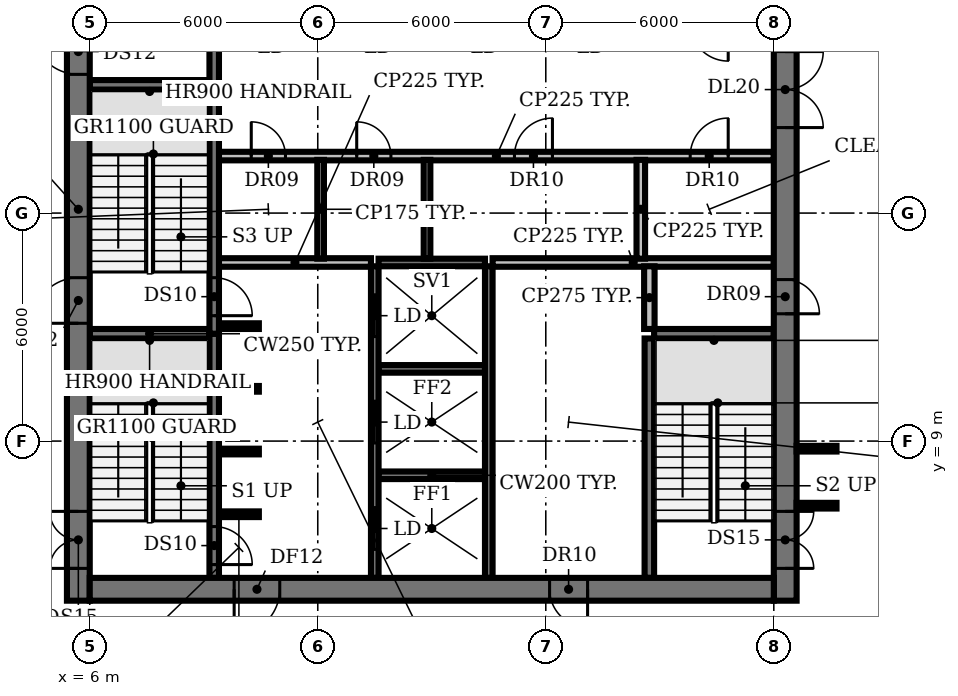
"""IFC4 building model, lengths in metres.
Left out: names, types, materials, properties, quantities, classifications, styles, units other than length and angle.
Written with IfcOpenShell. Run it as: python <this file> out.ifc"""

import sys

from ifc_helpers import new_model, si_unit, direction, frame, frame_2d, origin, place, context, subcontext, project, spatial, rectangle, extrude, element, fill, save


model = new_model("IFC4")
c1 = context("Model", 3, precision=1e-05, world=origin(), true_north=direction((0.0, 1.0)))
c2 = subcontext(c1, "Body", "Model", "MODEL_VIEW")
j1 = project(units=[si_unit("LENGTHUNIT", "METRE"), si_unit("PLANEANGLEUNIT", "RADIAN")], contexts=[c1])
p1 = place(None, origin())
s1 = spatial("IfcSite", under=j1, at=p1, CompositionType="ELEMENT")
p2 = place(p1, origin())
s2 = spatial("IfcBuilding", under=s1, at=p2, CompositionType="ELEMENT")
p3 = place(p2, frame((0.0, 0.0, 188.6)))
s3 = spatial("IfcBuildingStorey", under=s2, at=p3, CompositionType="ELEMENT", Elevation=188.6)
p4 = place(p3, frame((9.4, 7.075, 0.0), z_axis=(0.0, 0.0, 1.0), x_axis=(1.0, 0.0, 0.0)))
e1 = element("IfcWall", 1, at=p4, inside=s3, PredefinedType="SHEAR", context=c2, shape_type="SweptSolid", body=[
    extrude(rectangle(XDim=1.05, YDim=0.15, at=frame_2d((0.525, 0.0))), origin(), (0.0, 0.0, 1.0), 3.85),
])
p5 = place(p3, frame((13.6, 8.1, 0.0), z_axis=(0.0, 0.0, 1.0), x_axis=(1.0, 0.0, 0.0)))
e2 = element("IfcWall", 2, at=p5, inside=s3, PredefinedType="SHEAR", context=c2, shape_type="SweptSolid", body=[
    extrude(rectangle(XDim=2.8, YDim=0.2, at=frame_2d((1.4, 0.0))), origin(), (0.0, 0.0, 1.0), 3.85),
])
for number, where, z_axis, x_axis in (
    (3, (9.4, 8.725, 0.0), (0.0, 0.0, 1.0), (1.0, 0.0, 0.0)),
    (4, (9.4, 10.375, 0.0), (0.0, 0.0, 1.0), (1.0, 0.0, 0.0)),
):
    element("IfcWall", number, at=place(p3, frame(where, z_axis=z_axis, x_axis=x_axis)), inside=s3, PredefinedType="SHEAR", context=c2, shape_type="SweptSolid", body=[
        extrude(rectangle(XDim=1.05, YDim=0.15, at=frame_2d((0.525, 0.0))), origin(), (0.0, 0.0, 1.0), 3.85),
    ])
p6 = place(p3, frame((13.6, 10.9, 0.0), z_axis=(0.0, 0.0, 1.0), x_axis=(1.0, 0.0, 0.0)))
e5 = element("IfcWall", 5, at=p6, inside=s3, PredefinedType="SHEAR", context=c2, shape_type="SweptSolid", body=[
    extrude(rectangle(XDim=2.8, YDim=0.2, at=frame_2d((1.4, 0.0))), origin(), (0.0, 0.0, 1.0), 3.85),
])
for number, where, z_axis, x_axis in (
    (6, (6.0, 11.825, 0.0), (0.0, 0.0, 1.0), (1.0, 0.0, 0.0)),
    (7, (20.85, 11.825, 0.0), (0.0, 0.0, 1.0), (1.0, 0.0, 0.0)),
):
    element("IfcWall", number, at=place(p3, frame(where, z_axis=z_axis, x_axis=x_axis)), inside=s3, PredefinedType="SHEAR", context=c2, shape_type="SweptSolid", body=[
        extrude(rectangle(XDim=3.15, YDim=0.25, at=frame_2d((1.575, 0.0))), origin(), (0.0, 0.0, 1.0), 3.85),
    ])
p7 = place(p3, frame((9.4, 12.025, 0.0), z_axis=(0.0, 0.0, 1.0), x_axis=(1.0, 0.0, 0.0)))
e8 = element("IfcWall", 8, at=p7, inside=s3, PredefinedType="SHEAR", context=c2, shape_type="SweptSolid", body=[
    extrude(rectangle(XDim=1.05, YDim=0.15, at=frame_2d((0.525, 0.0))), origin(), (0.0, 0.0, 1.0), 3.85),
])
p8 = place(p3, frame((9.4, 13.7, 0.0), z_axis=(0.0, 0.0, 1.0), x_axis=(1.0, 0.0, 0.0)))
e9 = element("IfcWall", 9, at=p8, inside=s3, PredefinedType="PARTITIONING", context=c2, shape_type="SweptSolid", body=[
    extrude(rectangle(XDim=4.0, YDim=0.225, at=frame_2d((2.0, 0.0))), origin(), (0.0, 0.0, 1.0), 3.85),
])
p9 = place(p3, frame((13.6, 13.7, 0.0), z_axis=(0.0, 0.0, 1.0), x_axis=(1.0, 0.0, 0.0)))
e10 = element("IfcWall", 10, at=p9, inside=s3, PredefinedType="SHEAR", context=c2, shape_type="SweptSolid", body=[
    extrude(rectangle(XDim=2.8, YDim=0.2, at=frame_2d((1.4, 0.0))), origin(), (0.0, 0.0, 1.0), 3.85),
])
p10 = place(p3, frame((16.6, 13.7, 0.0), z_axis=(0.0, 0.0, 1.0), x_axis=(1.0, 0.0, 0.0)))
e11 = element("IfcWall", 11, at=p10, inside=s3, PredefinedType="PARTITIONING", context=c2, shape_type="SweptSolid", body=[
    extrude(rectangle(XDim=7.4, YDim=0.225, at=frame_2d((3.7, 0.0))), origin(), (0.0, 0.0, 1.0), 3.85),
])
p11 = place(p3, frame((9.4, 16.5, 0.0), z_axis=(0.0, 0.0, 1.0), x_axis=(1.0, 0.0, 0.0)))
e12 = element("IfcWall", 12, at=p11, inside=s3, PredefinedType="PARTITIONING", context=c2, shape_type="SweptSolid", body=[
    extrude(rectangle(XDim=14.6, YDim=0.225, at=frame_2d((7.3, 0.0))), origin(), (0.0, 0.0, 1.0), 3.85),
])
p12 = place(p11, frame((0.85, 0.0, 0.0)))
e13 = element("IfcOpeningElement", 13, at=p12, cuts=e12, PredefinedType="OPENING", context=c2, shape_type="SweptSolid", body=[
    extrude(rectangle(XDim=0.9, YDim=2.1, at=frame_2d((0.45, 1.05))), frame((0.0, 0.123, 0.0), z_axis=(0.0, -1.0, 0.0), x_axis=(1.0, 0.0, 0.0)), (0.0, 0.0, 1.0), 0.245),
])
p13 = place(p11, frame((3.625, 0.0, 0.0)))
e14 = element("IfcOpeningElement", 14, at=p13, cuts=e12, PredefinedType="OPENING", context=c2, shape_type="SweptSolid", body=[
    extrude(rectangle(XDim=0.9, YDim=2.1, at=frame_2d((0.45, 1.05))), frame((0.0, 0.123, 0.0), z_axis=(0.0, -1.0, 0.0), x_axis=(1.0, 0.0, 0.0)), (0.0, 0.0, 1.0), 0.245),
])
p14 = place(p11, frame((7.775, 0.0, 0.0)))
e15 = element("IfcOpeningElement", 15, at=p14, cuts=e12, PredefinedType="OPENING", context=c2, shape_type="SweptSolid", body=[
    extrude(rectangle(XDim=1.0, YDim=2.1, at=frame_2d((0.5, 1.05))), frame((0.0, 0.123, 0.0), z_axis=(0.0, -1.0, 0.0), x_axis=(1.0, 0.0, 0.0)), (0.0, 0.0, 1.0), 0.245),
])
p15 = place(p11, frame((12.4, 0.0, 0.0)))
e16 = element("IfcOpeningElement", 16, at=p15, cuts=e12, PredefinedType="OPENING", context=c2, shape_type="SweptSolid", body=[
    extrude(rectangle(XDim=1.0, YDim=2.1, at=frame_2d((0.5, 1.05))), frame((0.0, 0.123, 0.0), z_axis=(0.0, -1.0, 0.0), x_axis=(1.0, 0.0, 0.0)), (0.0, 0.0, 1.0), 0.245),
])
p16 = place(p3, frame((6.0, 18.375, 0.0), z_axis=(0.0, 0.0, 1.0), x_axis=(1.0, 0.0, 0.0)))
e17 = element("IfcWall", 17, at=p16, inside=s3, PredefinedType="SHEAR", context=c2, shape_type="SweptSolid", body=[
    extrude(rectangle(XDim=3.15, YDim=0.25, at=frame_2d((1.575, 0.0))), origin(), (0.0, 0.0, 1.0), 3.85),
])
p17 = place(p3, frame((9.275, 11.825, 0.0), z_axis=(0.0, 0.0, 1.0), x_axis=(0.0, -1.0, 0.0)))
e18 = element("IfcWall", 18, at=p17, inside=s3, PredefinedType="SHEAR", context=c2, shape_type="SweptSolid", body=[
    extrude(rectangle(XDim=6.425, YDim=0.25, at=frame_2d((3.212, 0.0))), origin(), (0.0, 0.0, 1.0), 3.85),
])
p18 = place(p17, frame((5.075, 0.0, 0.0)))
e19 = element("IfcOpeningElement", 19, at=p18, cuts=e18, PredefinedType="OPENING", context=c2, shape_type="SweptSolid", body=[
    extrude(rectangle(XDim=1.0, YDim=2.1, at=frame_2d((0.5, 1.05))), frame((0.0, 0.135, 0.0), z_axis=(0.0, -1.0, 0.0), x_axis=(1.0, 0.0, 0.0)), (0.0, 0.0, 1.0), 0.27),
])
p19 = place(p3, frame((9.275, 18.375, 0.0), z_axis=(0.0, 0.0, 1.0), x_axis=(0.0, -1.0, 0.0)))
e20 = element("IfcWall", 20, at=p19, inside=s3, PredefinedType="SHEAR", context=c2, shape_type="SweptSolid", body=[
    extrude(rectangle(XDim=6.55, YDim=0.25, at=frame_2d((3.275, 0.0))), origin(), (0.0, 0.0, 1.0), 3.85),
])
p20 = place(p19, frame((5.075, 0.0, 0.0)))
e21 = element("IfcOpeningElement", 21, at=p20, cuts=e20, PredefinedType="OPENING", context=c2, shape_type="SweptSolid", body=[
    extrude(rectangle(XDim=1.0, YDim=2.1, at=frame_2d((0.5, 1.05))), frame((0.0, 0.135, 0.0), z_axis=(0.0, -1.0, 0.0), x_axis=(1.0, 0.0, 0.0)), (0.0, 0.0, 1.0), 0.27),
])
p21 = place(p3, frame((9.275, 18.375, 0.0), z_axis=(0.0, 0.0, 1.0), x_axis=(0.0, 1.0, 0.0)))
e22 = element("IfcWall", 22, at=p21, inside=s3, PredefinedType="SHEAR", context=c2, shape_type="SweptSolid", body=[
    extrude(rectangle(XDim=6.425, YDim=0.25, at=frame_2d((3.212, 0.0))), origin(), (0.0, 0.0, 1.0), 3.85),
])
p22 = place(p3, frame((12.075, 13.8, 0.0), z_axis=(0.0, 0.0, 1.0), x_axis=(0.0, 1.0, 0.0)))
e23 = element("IfcWall", 23, at=p22, inside=s3, PredefinedType="PARTITIONING", context=c2, shape_type="SweptSolid", body=[
    extrude(rectangle(XDim=2.6, YDim=0.175, at=frame_2d((1.3, 0.0))), origin(), (0.0, 0.0, 1.0), 3.85),
])
p23 = place(p3, frame((13.5, 5.4, 0.0), z_axis=(0.0, 0.0, 1.0), x_axis=(0.0, 1.0, 0.0)))
e24 = element("IfcWall", 24, at=p23, inside=s3, PredefinedType="SHEAR", context=c2, shape_type="SweptSolid", body=[
    extrude(rectangle(XDim=8.2, YDim=0.2, at=frame_2d((4.1, 0.0))), origin(), (0.0, 0.0, 1.0), 3.85),
])
p24 = place(p23, frame((0.75, 0.0, 0.0)))
e25 = element("IfcOpeningElement", 25, at=p24, cuts=e24, PredefinedType="OPENING", context=c2, shape_type="SweptSolid", body=[
    extrude(rectangle(XDim=1.1, YDim=2.1, at=frame_2d((0.55, 1.05))), frame((0.0, 0.11, 0.0), z_axis=(0.0, -1.0, 0.0), x_axis=(1.0, 0.0, 0.0)), (0.0, 0.0, 1.0), 0.22),
])
p25 = place(p23, frame((3.55, 0.0, 0.0)))
e26 = element("IfcOpeningElement", 26, at=p25, cuts=e24, PredefinedType="OPENING", context=c2, shape_type="SweptSolid", body=[
    extrude(rectangle(XDim=1.1, YDim=2.1, at=frame_2d((0.55, 1.05))), frame((0.0, 0.11, 0.0), z_axis=(0.0, -1.0, 0.0), x_axis=(1.0, 0.0, 0.0)), (0.0, 0.0, 1.0), 0.22),
])
p26 = place(p23, frame((6.35, 0.0, 0.0)))
e27 = element("IfcOpeningElement", 27, at=p26, cuts=e24, PredefinedType="OPENING", context=c2, shape_type="SweptSolid", body=[
    extrude(rectangle(XDim=1.1, YDim=2.1, at=frame_2d((0.55, 1.05))), frame((0.0, 0.11, 0.0), z_axis=(0.0, -1.0, 0.0), x_axis=(1.0, 0.0, 0.0)), (0.0, 0.0, 1.0), 0.22),
])
p27 = place(p3, frame((14.875, 13.8, 0.0), z_axis=(0.0, 0.0, 1.0), x_axis=(0.0, 1.0, 0.0)))
e28 = element("IfcWall", 28, at=p27, inside=s3, PredefinedType="PARTITIONING", context=c2, shape_type="SweptSolid", body=[
    extrude(rectangle(XDim=2.6, YDim=0.175, at=frame_2d((1.3, 0.0))), origin(), (0.0, 0.0, 1.0), 3.85),
])
p28 = place(p3, frame((16.5, 5.4, 0.0), z_axis=(0.0, 0.0, 1.0), x_axis=(0.0, 1.0, 0.0)))
e29 = element("IfcWall", 29, at=p28, inside=s3, PredefinedType="SHEAR", context=c2, shape_type="SweptSolid", body=[
    extrude(rectangle(XDim=8.2, YDim=0.2, at=frame_2d((4.1, 0.0))), origin(), (0.0, 0.0, 1.0), 3.85),
])
p29 = place(p3, frame((20.5, 13.8, 0.0), z_axis=(0.0, 0.0, 1.0), x_axis=(0.0, 1.0, 0.0)))
e30 = element("IfcWall", 30, at=p29, inside=s3, PredefinedType="PARTITIONING", context=c2, shape_type="SweptSolid", body=[
    extrude(rectangle(XDim=2.6, YDim=0.225, at=frame_2d((1.3, 0.0))), origin(), (0.0, 0.0, 1.0), 3.85),
])
p30 = place(p3, frame((20.725, 5.4, 0.0), z_axis=(0.0, 0.0, 1.0), x_axis=(0.0, 1.0, 0.0)))
e31 = element("IfcWall", 31, at=p30, inside=s3, PredefinedType="SHEAR", context=c2, shape_type="SweptSolid", body=[
    extrude(rectangle(XDim=6.3, YDim=0.25, at=frame_2d((3.15, 0.0))), origin(), (0.0, 0.0, 1.0), 3.85),
])
p31 = place(p3, frame((20.725, 11.95, 0.0), z_axis=(0.0, 0.0, 1.0), x_axis=(0.0, 1.0, 0.0)))
e32 = element("IfcWall", 32, at=p31, inside=s3, PredefinedType="PARTITIONING", context=c2, shape_type="SweptSolid", body=[
    extrude(rectangle(XDim=1.65, YDim=0.275, at=frame_2d((0.825, 0.0))), origin(), (0.0, 0.0, 1.0), 3.85),
])
p32 = place(p3, frame((5.7, 4.8, 0.0), z_axis=(0.0, 0.0, 1.0), x_axis=(0.0, 1.0, 0.0)))
e33 = element("IfcWall", 33, at=p32, inside=s3, PredefinedType="SHEAR", context=c2, shape_type="SweptSolid", body=[
    extrude(rectangle(XDim=20.6, YDim=0.6, at=frame_2d((10.3, 0.0))), origin(), (0.0, 0.0, 1.0), 3.85),
])
p33 = place(p32, frame((0.85, 0.0, 0.0)))
e34 = element("IfcOpeningElement", 34, at=p33, cuts=e33, PredefinedType="OPENING", context=c2, shape_type="SweptSolid", body=[
    extrude(rectangle(XDim=1.5, YDim=2.1, at=frame_2d((0.75, 1.05))), frame((0.0, 0.31, 0.0), z_axis=(0.0, -1.0, 0.0), x_axis=(1.0, 0.0, 0.0)), (0.0, 0.0, 1.0), 0.62),
])
p34 = place(p32, frame((7.3, 0.0, 0.0)))
e35 = element("IfcOpeningElement", 35, at=p34, cuts=e33, PredefinedType="OPENING", context=c2, shape_type="SweptSolid", body=[
    extrude(rectangle(XDim=1.2, YDim=2.1, at=frame_2d((0.6, 1.05))), frame((0.0, 0.31, 0.0), z_axis=(0.0, -1.0, 0.0), x_axis=(1.0, 0.0, 0.0)), (0.0, 0.0, 1.0), 0.62),
])
p35 = place(p32, frame((13.85, 0.0, 0.0)))
e36 = element("IfcOpeningElement", 36, at=p35, cuts=e33, PredefinedType="OPENING", context=c2, shape_type="SweptSolid", body=[
    extrude(rectangle(XDim=1.2, YDim=2.1, at=frame_2d((0.6, 1.05))), frame((0.0, 0.31, 0.0), z_axis=(0.0, -1.0, 0.0), x_axis=(1.0, 0.0, 0.0)), (0.0, 0.0, 1.0), 0.62),
])
p36 = place(p3, frame((24.3, 25.555, 0.0), z_axis=(0.0, 0.0, 1.0), x_axis=(0.0, -1.0, 0.0)))
e37 = element("IfcWall", 37, at=p36, inside=s3, PredefinedType="SHEAR", context=c2, shape_type="SweptSolid", body=[
    extrude(rectangle(XDim=20.755, YDim=0.6, at=frame_2d((10.377, 0.0))), origin(), (0.0, 0.0, 1.0), 3.85),
])
p37 = place(p36, frame((18.405, 0.0, 0.0)))
e38 = element("IfcOpeningElement", 38, at=p37, cuts=e37, PredefinedType="OPENING", context=c2, shape_type="SweptSolid", body=[
    extrude(rectangle(XDim=1.5, YDim=2.1, at=frame_2d((0.75, 1.05))), frame((0.0, 0.31, 0.0), z_axis=(0.0, -1.0, 0.0), x_axis=(1.0, 0.0, 0.0)), (0.0, 0.0, 1.0), 0.62),
])
p38 = place(p36, frame((12.305, 0.0, 0.0)))
e39 = element("IfcOpeningElement", 39, at=p38, cuts=e37, PredefinedType="OPENING", context=c2, shape_type="SweptSolid", body=[
    extrude(rectangle(XDim=0.9, YDim=2.1, at=frame_2d((0.45, 1.05))), frame((0.0, 0.31, 0.0), z_axis=(0.0, -1.0, 0.0), x_axis=(1.0, 0.0, 0.0)), (0.0, 0.0, 1.0), 0.62),
])
p39 = place(p36, frame((6.305, 0.0, 0.0)))
e40 = element("IfcOpeningElement", 40, at=p39, cuts=e37, PredefinedType="OPENING", context=c2, shape_type="SweptSolid", body=[
    extrude(rectangle(XDim=2.0, YDim=2.1, at=frame_2d((1.0, 1.05))), frame((0.0, 0.31, 0.0), z_axis=(0.0, -1.0, 0.0), x_axis=(1.0, 0.0, 0.0)), (0.0, 0.0, 1.0), 0.62),
])
p40 = place(p3, frame((24.0, 5.1, 0.0), z_axis=(0.0, 0.0, 1.0), x_axis=(-1.0, 0.0, 0.0)))
e41 = element("IfcWall", 41, at=p40, inside=s3, PredefinedType="SHEAR", context=c2, shape_type="SweptSolid", body=[
    extrude(rectangle(XDim=18.0, YDim=0.6, at=frame_2d((9.0, 0.0))), origin(), (0.0, 0.0, 1.0), 3.85),
])
p41 = place(p40, frame((13.0, 0.0, 0.0)))
e42 = element("IfcOpeningElement", 42, at=p41, cuts=e41, PredefinedType="OPENING", context=c2, shape_type="SweptSolid", body=[
    extrude(rectangle(XDim=1.2, YDim=2.1, at=frame_2d((0.6, 1.05))), frame((0.0, 0.31, 0.0), z_axis=(0.0, -1.0, 0.0), x_axis=(1.0, 0.0, 0.0)), (0.0, 0.0, 1.0), 0.62),
])
p42 = place(p40, frame((4.9, 0.0, 0.0)))
e43 = element("IfcOpeningElement", 43, at=p42, cuts=e41, PredefinedType="OPENING", context=c2, shape_type="SweptSolid", body=[
    extrude(rectangle(XDim=1.0, YDim=2.1, at=frame_2d((0.5, 1.05))), frame((0.0, 0.31, 0.0), z_axis=(0.0, -1.0, 0.0), x_axis=(1.0, 0.0, 0.0)), (0.0, 0.0, 1.0), 0.62),
])
for number, where, z_axis, x_axis in (
    (44, (24.6, 7.3, 0.0), (0.0, 0.0, 1.0), (1.0, 0.0, 0.0)),
    (45, (24.6, 8.8, 0.0), (0.0, 0.0, 1.0), (1.0, 0.0, 0.0)),
):
    element("IfcWall", number, at=place(p3, frame(where, z_axis=z_axis, x_axis=x_axis)), inside=s3, PredefinedType="PARTITIONING", context=c2, shape_type="SweptSolid", body=[
        extrude(rectangle(XDim=1.05, YDim=0.15, at=frame_2d((0.525, 0.0))), origin(), (0.0, 0.0, 1.0), 2.88),
    ])
p43 = place(p12, origin())
e46 = element("IfcDoor", 46, at=p43, inside=s3, OperationType="SINGLE_SWING_LEFT", PredefinedType="DOOR", context=c2, shape_type="SweptSolid", body=[
    extrude(rectangle(XDim=0.9, YDim=2.1, at=frame_2d((0.45, 1.05))), frame((0.0, 0.025, 0.0), z_axis=(0.0, -1.0, 0.0), x_axis=(1.0, 0.0, 0.0)), (0.0, 0.0, 1.0), 0.05),
])
fill(e13, e46)
p44 = place(p13, origin())
e47 = element("IfcDoor", 47, at=p44, inside=s3, OperationType="SINGLE_SWING_LEFT", PredefinedType="DOOR", context=c2, shape_type="SweptSolid", body=[
    extrude(rectangle(XDim=0.9, YDim=2.1, at=frame_2d((0.45, 1.05))), frame((0.0, 0.025, 0.0), z_axis=(0.0, -1.0, 0.0), x_axis=(1.0, 0.0, 0.0)), (0.0, 0.0, 1.0), 0.05),
])
fill(e14, e47)
p45 = place(p14, origin())
e48 = element("IfcDoor", 48, at=p45, inside=s3, OperationType="SINGLE_SWING_RIGHT", PredefinedType="DOOR", context=c2, shape_type="SweptSolid", body=[
    extrude(rectangle(XDim=1.0, YDim=2.1, at=frame_2d((0.5, 1.05))), frame((0.0, 0.025, 0.0), z_axis=(0.0, -1.0, 0.0), x_axis=(1.0, 0.0, 0.0)), (0.0, 0.0, 1.0), 0.05),
])
fill(e15, e48)
p46 = place(p15, origin())
e49 = element("IfcDoor", 49, at=p46, inside=s3, OperationType="SINGLE_SWING_RIGHT", PredefinedType="DOOR", context=c2, shape_type="SweptSolid", body=[
    extrude(rectangle(XDim=1.0, YDim=2.1, at=frame_2d((0.5, 1.05))), frame((0.0, 0.025, 0.0), z_axis=(0.0, -1.0, 0.0), x_axis=(1.0, 0.0, 0.0)), (0.0, 0.0, 1.0), 0.05),
])
fill(e16, e49)
p47 = place(p18, origin())
e50 = element("IfcDoor", 50, at=p47, inside=s3, OperationType="SINGLE_SWING_RIGHT", PredefinedType="DOOR", context=c2, shape_type="SweptSolid", body=[
    extrude(rectangle(XDim=1.0, YDim=2.1, at=frame_2d((0.5, 1.05))), frame((0.0, 0.025, 0.0), z_axis=(0.0, -1.0, 0.0), x_axis=(1.0, 0.0, 0.0)), (0.0, 0.0, 1.0), 0.05),
])
fill(e19, e50)
p48 = place(p20, origin())
e51 = element("IfcDoor", 51, at=p48, inside=s3, OperationType="SINGLE_SWING_RIGHT", PredefinedType="DOOR", context=c2, shape_type="SweptSolid", body=[
    extrude(rectangle(XDim=1.0, YDim=2.1, at=frame_2d((0.5, 1.05))), frame((0.0, 0.025, 0.0), z_axis=(0.0, -1.0, 0.0), x_axis=(1.0, 0.0, 0.0)), (0.0, 0.0, 1.0), 0.05),
])
fill(e21, e51)
p49 = place(p24, origin())
e52 = element("IfcDoor", 52, at=p49, inside=s3, OperationType="DOUBLE_DOOR_SLIDING", PredefinedType="DOOR", context=c2, shape_type="SweptSolid", body=[
    extrude(rectangle(XDim=1.1, YDim=2.1, at=frame_2d((0.55, 1.05))), frame((0.0, 0.025, 0.0), z_axis=(0.0, -1.0, 0.0), x_axis=(1.0, 0.0, 0.0)), (0.0, 0.0, 1.0), 0.05),
])
fill(e25, e52)
p50 = place(p25, origin())
e53 = element("IfcDoor", 53, at=p50, inside=s3, OperationType="DOUBLE_DOOR_SLIDING", PredefinedType="DOOR", context=c2, shape_type="SweptSolid", body=[
    extrude(rectangle(XDim=1.1, YDim=2.1, at=frame_2d((0.55, 1.05))), frame((0.0, 0.025, 0.0), z_axis=(0.0, -1.0, 0.0), x_axis=(1.0, 0.0, 0.0)), (0.0, 0.0, 1.0), 0.05),
])
fill(e26, e53)
p51 = place(p26, origin())
e54 = element("IfcDoor", 54, at=p51, inside=s3, OperationType="DOUBLE_DOOR_SLIDING", PredefinedType="DOOR", context=c2, shape_type="SweptSolid", body=[
    extrude(rectangle(XDim=1.1, YDim=2.1, at=frame_2d((0.55, 1.05))), frame((0.0, 0.025, 0.0), z_axis=(0.0, -1.0, 0.0), x_axis=(1.0, 0.0, 0.0)), (0.0, 0.0, 1.0), 0.05),
])
fill(e27, e54)
p52 = place(p33, origin())
e55 = element("IfcDoor", 55, at=p52, inside=s3, OperationType="DOUBLE_DOOR_SINGLE_SWING", PredefinedType="DOOR", context=c2, shape_type="SweptSolid", body=[
    extrude(rectangle(XDim=1.5, YDim=2.1, at=frame_2d((0.75, 1.05))), frame((0.0, 0.025, 0.0), z_axis=(0.0, -1.0, 0.0), x_axis=(1.0, 0.0, 0.0)), (0.0, 0.0, 1.0), 0.05),
])
fill(e34, e55)
p53 = place(p34, origin())
e56 = element("IfcDoor", 56, at=p53, inside=s3, OperationType="SINGLE_SWING_LEFT", PredefinedType="DOOR", context=c2, shape_type="SweptSolid", body=[
    extrude(rectangle(XDim=1.2, YDim=2.1, at=frame_2d((0.6, 1.05))), frame((0.0, 0.025, 0.0), z_axis=(0.0, -1.0, 0.0), x_axis=(1.0, 0.0, 0.0)), (0.0, 0.0, 1.0), 0.05),
])
fill(e35, e56)
p54 = place(p35, origin())
e57 = element("IfcDoor", 57, at=p54, inside=s3, OperationType="SINGLE_SWING_RIGHT", PredefinedType="DOOR", context=c2, shape_type="SweptSolid", body=[
    extrude(rectangle(XDim=1.2, YDim=2.1, at=frame_2d((0.6, 1.05))), frame((0.0, 0.025, 0.0), z_axis=(0.0, -1.0, 0.0), x_axis=(1.0, 0.0, 0.0)), (0.0, 0.0, 1.0), 0.05),
])
fill(e36, e57)
p55 = place(p37, origin())
e58 = element("IfcDoor", 58, at=p55, inside=s3, OperationType="DOUBLE_DOOR_SINGLE_SWING", PredefinedType="DOOR", context=c2, shape_type="SweptSolid", body=[
    extrude(rectangle(XDim=1.5, YDim=2.1, at=frame_2d((0.75, 1.05))), frame((0.0, 0.025, 0.0), z_axis=(0.0, -1.0, 0.0), x_axis=(1.0, 0.0, 0.0)), (0.0, 0.0, 1.0), 0.05),
])
fill(e38, e58)
p56 = place(p38, origin())
e59 = element("IfcDoor", 59, at=p56, inside=s3, OperationType="SINGLE_SWING_RIGHT", PredefinedType="DOOR", context=c2, shape_type="SweptSolid", body=[
    extrude(rectangle(XDim=0.9, YDim=2.1, at=frame_2d((0.45, 1.05))), frame((0.0, -0.24, 0.0), z_axis=(0.0, -1.0, 0.0), x_axis=(1.0, 0.0, 0.0)), (0.0, 0.0, 1.0), 0.05),
])
fill(e39, e59)
p57 = place(p39, origin())
e60 = element("IfcDoor", 60, at=p57, inside=s3, OperationType="DOUBLE_DOOR_SINGLE_SWING", PredefinedType="DOOR", context=c2, shape_type="SweptSolid", body=[
    extrude(rectangle(XDim=2.0, YDim=2.1, at=frame_2d((1.0, 1.05))), frame((0.0, 0.025, 0.0), z_axis=(0.0, -1.0, 0.0), x_axis=(1.0, 0.0, 0.0)), (0.0, 0.0, 1.0), 0.05),
])
fill(e40, e60)
p58 = place(p41, origin())
e61 = element("IfcDoor", 61, at=p58, inside=s3, OperationType="SINGLE_SWING_RIGHT", PredefinedType="DOOR", context=c2, shape_type="SweptSolid", body=[
    extrude(rectangle(XDim=1.2, YDim=2.1, at=frame_2d((0.6, 1.05))), frame((0.0, 0.025, 0.0), z_axis=(0.0, -1.0, 0.0), x_axis=(1.0, 0.0, 0.0)), (0.0, 0.0, 1.0), 0.05),
])
fill(e42, e61)
p59 = place(p42, origin())
e62 = element("IfcDoor", 62, at=p59, inside=s3, OperationType="SINGLE_SWING_LEFT", PredefinedType="DOOR", context=c2, shape_type="SweptSolid", body=[
    extrude(rectangle(XDim=1.0, YDim=2.1, at=frame_2d((0.5, 1.05))), frame((0.0, -0.24, 0.0), z_axis=(0.0, -1.0, 0.0), x_axis=(1.0, 0.0, 0.0)), (0.0, 0.0, 1.0), 0.05),
])
fill(e43, e62)
save(model, sys.argv[1])
